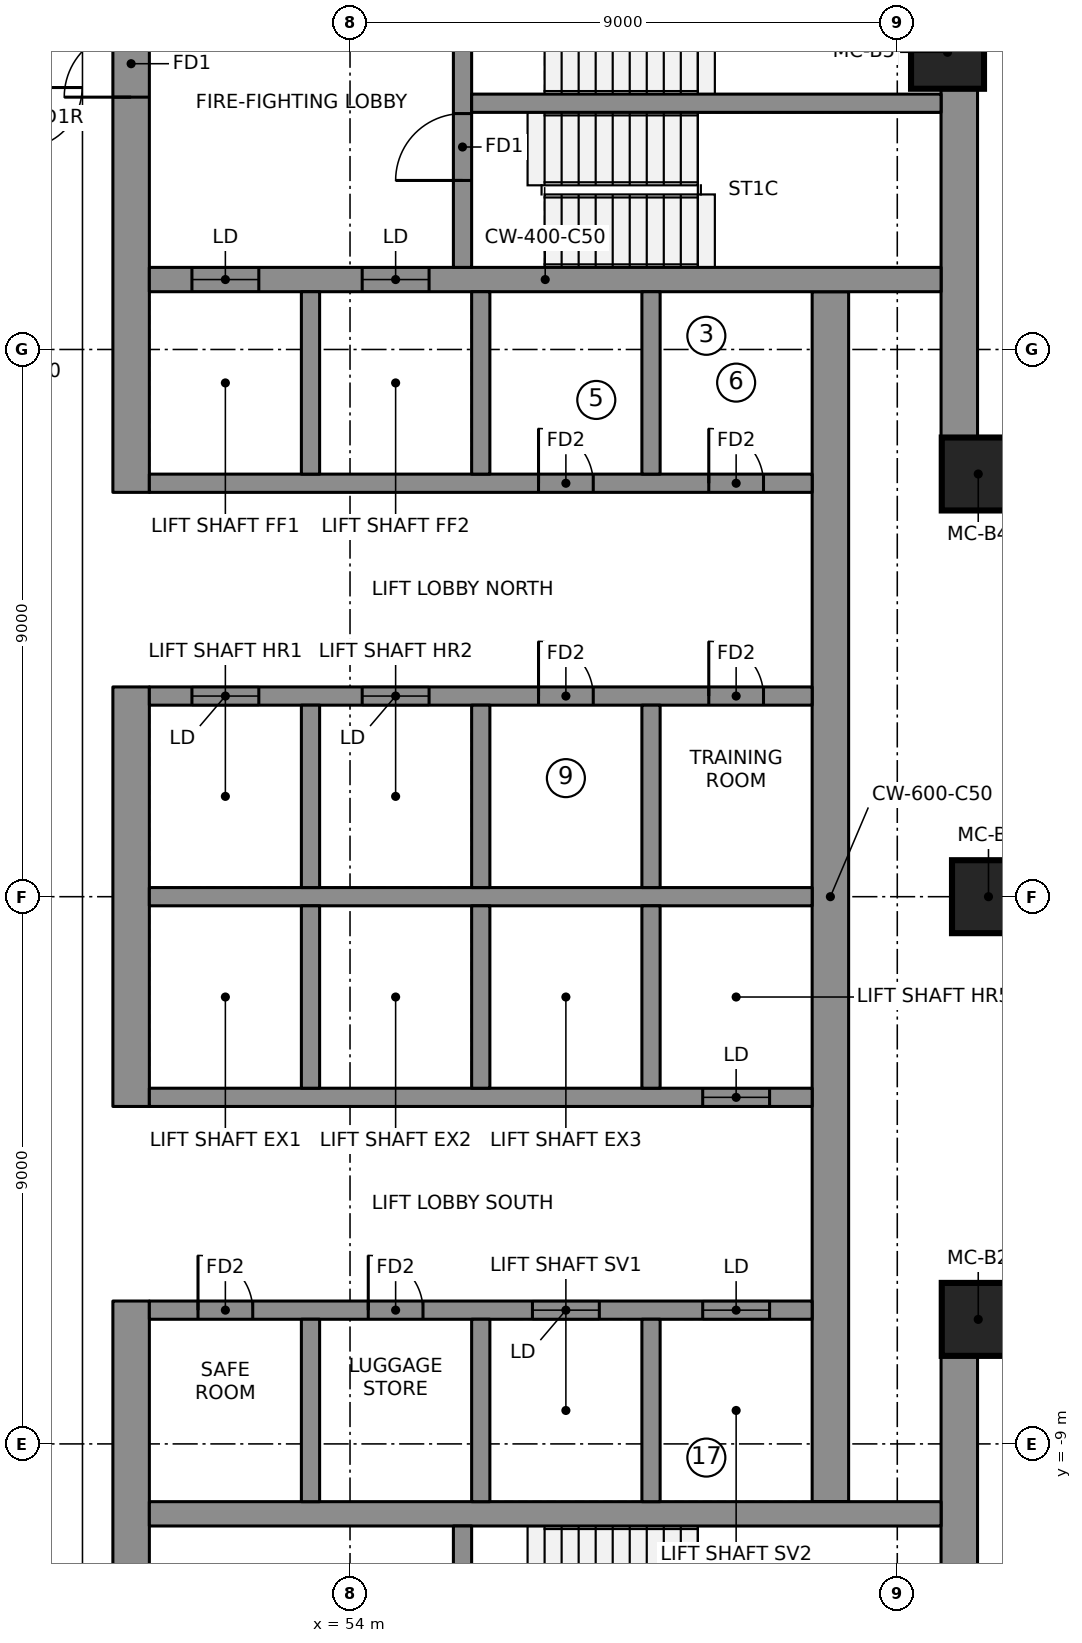
"""IFC4 building model, lengths in metres.
Left out: names, types, materials, properties, quantities, classifications, styles, units other than length and angle.
Written with IfcOpenShell. Run it as: python <this file> out.ifc"""

import sys

from ifc_helpers import new_model, si_unit, direction, frame, frame_2d, origin, origin_2d, place, context, subcontext, project, spatial, rectangle, extrude, element, fill, save


model = new_model("IFC4")
c1 = context("Model", 3, precision=1e-05, world=origin(), true_north=direction((0.0, 1.0)))
c2 = subcontext(c1, "Body", "Model", "MODEL_VIEW")
j1 = project(units=[si_unit("LENGTHUNIT", "METRE"), si_unit("PLANEANGLEUNIT", "RADIAN")], contexts=[c1])
p1 = place(None, origin())
s1 = spatial("IfcSite", under=j1, at=p1, CompositionType="ELEMENT")
p2 = place(p1, origin())
s2 = spatial("IfcBuilding", under=s1, at=p2, CompositionType="ELEMENT")
p3 = place(p2, frame((0.0, 0.0, 224.35)))
s3 = spatial("IfcBuildingStorey", under=s2, at=p3, CompositionType="ELEMENT", Elevation=224.35)
p4 = place(p3, frame((50.4, 6.65, 0.0), z_axis=(0.0, 0.0, 1.0), x_axis=(0.0, 1.0, 0.0)))
e1 = element("IfcWall", 1, at=p4, inside=s3, PredefinedType="SHEAR", context=c2, shape_type="SweptSolid", body=[
    extrude(rectangle(XDim=9.7, YDim=0.6, at=frame_2d((4.85, 0.0))), origin(), (0.0, 0.0, 1.0), 3.55),
])
p5 = place(p4, frame((6.5, 0.0, 0.0)))
e2 = element("IfcOpeningElement", 2, at=p5, cuts=e1, PredefinedType="OPENING", context=c2, shape_type="SweptSolid", body=[
    extrude(rectangle(XDim=1.1, YDim=2.1, at=frame_2d((0.55, 1.05))), frame((0.0, 0.31, 0.0), z_axis=(0.0, -1.0, 0.0), x_axis=(1.0, 0.0, 0.0)), (0.0, 0.0, 1.0), 0.62),
])
p6 = place(p3, frame((50.4, -3.45, 0.0), z_axis=(0.0, 0.0, 1.0), x_axis=(0.0, 1.0, 0.0)))
e3 = element("IfcWall", 3, at=p6, inside=s3, PredefinedType="SHEAR", context=c2, shape_type="SweptSolid", body=[
    extrude(rectangle(XDim=6.9, YDim=0.6, at=frame_2d((3.45, 0.0))), origin(), (0.0, 0.0, 1.0), 3.55),
])
p7 = place(p3, frame((50.4, -16.35, 0.0), z_axis=(0.0, 0.0, 1.0), x_axis=(0.0, 1.0, 0.0)))
e4 = element("IfcWall", 4, at=p7, inside=s3, PredefinedType="SHEAR", context=c2, shape_type="SweptSolid", body=[
    extrude(rectangle(XDim=9.7, YDim=0.6, at=frame_2d((4.85, 0.0))), origin(), (0.0, 0.0, 1.0), 3.55),
])
p8 = place(p7, frame((2.1, 0.0, 0.0)))
e5 = element("IfcOpeningElement", 5, at=p8, cuts=e4, PredefinedType="OPENING", context=c2, shape_type="SweptSolid", body=[
    extrude(rectangle(XDim=1.1, YDim=2.1, at=frame_2d((0.55, 1.05))), frame((0.0, 0.31, 0.0), z_axis=(0.0, -1.0, 0.0), x_axis=(1.0, 0.0, 0.0)), (0.0, 0.0, 1.0), 0.62),
])
for number, where, z_axis, x_axis in (
    (6, (64.02, 7.502, 0.0), (0.0, 0.0, 1.0), (0.0, 1.0, 0.0)),
    (7, (64.02, -15.75, 0.0), (0.0, 0.0, 1.0), (0.0, 1.0, 0.0)),
):
    element("IfcWall", number, at=place(p3, frame(where, z_axis=z_axis, x_axis=x_axis)), inside=s3, PredefinedType="SHEAR", context=c2, shape_type="SweptSolid", body=[
        extrude(rectangle(XDim=8.248, YDim=0.6, at=frame_2d((4.124, 0.0))), origin(), (0.0, 0.0, 1.0), 3.55),
    ])
p9 = place(p3, frame((61.9, -9.95, 0.0), z_axis=(0.0, 0.0, 1.0), x_axis=(0.0, 1.0, 0.0)))
e8 = element("IfcWall", 8, at=p9, inside=s3, PredefinedType="SHEAR", context=c2, shape_type="SweptSolid", body=[
    extrude(rectangle(XDim=19.9, YDim=0.6, at=frame_2d((9.95, 0.0))), origin(), (0.0, 0.0, 1.0), 3.55),
])
p10 = place(p3, frame((50.7, 10.15, 0.0), z_axis=(0.0, 0.0, 1.0), x_axis=(1.0, 0.0, 0.0)))
e9 = element("IfcWall", 9, at=p10, inside=s3, PredefinedType="SHEAR", context=c2, shape_type="SweptSolid", body=[
    extrude(rectangle(XDim=13.02, YDim=0.4, at=frame_2d((6.51, 0.0))), origin(), (0.0, 0.0, 1.0), 3.55),
])
p11 = place(p10, frame((0.7, 0.0, 0.0)))
e10 = element("IfcOpeningElement", 10, at=p11, cuts=e9, PredefinedType="OPENING", context=c2, shape_type="SweptSolid", body=[
    extrude(rectangle(XDim=1.1, YDim=2.1, at=frame_2d((0.55, 1.05))), frame((0.0, 0.21, 0.0), z_axis=(0.0, -1.0, 0.0), x_axis=(1.0, 0.0, 0.0)), (0.0, 0.0, 1.0), 0.42),
])
p12 = place(p10, frame((3.5, 0.0, 0.0)))
e11 = element("IfcOpeningElement", 11, at=p12, cuts=e9, PredefinedType="OPENING", context=c2, shape_type="SweptSolid", body=[
    extrude(rectangle(XDim=1.1, YDim=2.1, at=frame_2d((0.55, 1.05))), frame((0.0, 0.21, 0.0), z_axis=(0.0, -1.0, 0.0), x_axis=(1.0, 0.0, 0.0)), (0.0, 0.0, 1.0), 0.42),
])
p13 = place(p3, frame((50.7, -10.15, 0.0), z_axis=(0.0, 0.0, 1.0), x_axis=(1.0, 0.0, 0.0)))
e12 = element("IfcWall", 12, at=p13, inside=s3, PredefinedType="SHEAR", context=c2, shape_type="SweptSolid", body=[
    extrude(rectangle(XDim=13.02, YDim=0.4, at=frame_2d((6.51, 0.0))), origin(), (0.0, 0.0, 1.0), 3.55),
])
p14 = place(p3, frame((50.7, 0.0, 0.0), z_axis=(0.0, 0.0, 1.0), x_axis=(1.0, 0.0, 0.0)))
e13 = element("IfcWall", 13, at=p14, inside=s3, PredefinedType="SHEAR", context=c2, shape_type="SweptSolid", body=[
    extrude(rectangle(XDim=10.9, YDim=0.3, at=frame_2d((5.45, 0.0))), origin(), (0.0, 0.0, 1.0), 3.55),
])
p15 = place(p3, frame((50.7, 3.3, 0.0), z_axis=(0.0, 0.0, 1.0), x_axis=(1.0, 0.0, 0.0)))
e14 = element("IfcWall", 14, at=p15, inside=s3, PredefinedType="SHEAR", context=c2, shape_type="SweptSolid", body=[
    extrude(rectangle(XDim=10.9, YDim=0.3, at=frame_2d((5.45, 0.0))), origin(), (0.0, 0.0, 1.0), 3.55),
])
p16 = place(p15, frame((0.7, 0.0, 0.0)))
e15 = element("IfcOpeningElement", 15, at=p16, cuts=e14, PredefinedType="OPENING", context=c2, shape_type="SweptSolid", body=[
    extrude(rectangle(XDim=1.1, YDim=2.1, at=frame_2d((0.55, 1.05))), frame((0.0, 0.16, 0.0), z_axis=(0.0, -1.0, 0.0), x_axis=(1.0, 0.0, 0.0)), (0.0, 0.0, 1.0), 0.32),
])
p17 = place(p15, frame((3.5, 0.0, 0.0)))
e16 = element("IfcOpeningElement", 16, at=p17, cuts=e14, PredefinedType="OPENING", context=c2, shape_type="SweptSolid", body=[
    extrude(rectangle(XDim=1.1, YDim=2.1, at=frame_2d((0.55, 1.05))), frame((0.0, 0.16, 0.0), z_axis=(0.0, -1.0, 0.0), x_axis=(1.0, 0.0, 0.0)), (0.0, 0.0, 1.0), 0.32),
])
p18 = place(p15, frame((6.4, 0.0, 0.0)))
e17 = element("IfcOpeningElement", 17, at=p18, cuts=e14, PredefinedType="OPENING", context=c2, shape_type="SweptSolid", body=[
    extrude(rectangle(XDim=0.9, YDim=2.1, at=frame_2d((0.45, 1.05))), frame((0.0, 0.16, 0.0), z_axis=(0.0, -1.0, 0.0), x_axis=(1.0, 0.0, 0.0)), (0.0, 0.0, 1.0), 0.32),
])
p19 = place(p15, frame((9.2, 0.0, 0.0)))
e18 = element("IfcOpeningElement", 18, at=p19, cuts=e14, PredefinedType="OPENING", context=c2, shape_type="SweptSolid", body=[
    extrude(rectangle(XDim=0.9, YDim=2.1, at=frame_2d((0.45, 1.05))), frame((0.0, 0.16, 0.0), z_axis=(0.0, -1.0, 0.0), x_axis=(1.0, 0.0, 0.0)), (0.0, 0.0, 1.0), 0.32),
])
p20 = place(p3, frame((50.7, 6.8, 0.0), z_axis=(0.0, 0.0, 1.0), x_axis=(1.0, 0.0, 0.0)))
e19 = element("IfcWall", 19, at=p20, inside=s3, PredefinedType="SHEAR", context=c2, shape_type="SweptSolid", body=[
    extrude(rectangle(XDim=10.9, YDim=0.3, at=frame_2d((5.45, 0.0))), origin(), (0.0, 0.0, 1.0), 3.55),
])
p21 = place(p20, frame((6.4, 0.0, 0.0)))
e20 = element("IfcOpeningElement", 20, at=p21, cuts=e19, PredefinedType="OPENING", context=c2, shape_type="SweptSolid", body=[
    extrude(rectangle(XDim=0.9, YDim=2.1, at=frame_2d((0.45, 1.05))), frame((0.0, 0.16, 0.0), z_axis=(0.0, -1.0, 0.0), x_axis=(1.0, 0.0, 0.0)), (0.0, 0.0, 1.0), 0.32),
])
p22 = place(p20, frame((9.2, 0.0, 0.0)))
e21 = element("IfcOpeningElement", 21, at=p22, cuts=e19, PredefinedType="OPENING", context=c2, shape_type="SweptSolid", body=[
    extrude(rectangle(XDim=0.9, YDim=2.1, at=frame_2d((0.45, 1.05))), frame((0.0, 0.16, 0.0), z_axis=(0.0, -1.0, 0.0), x_axis=(1.0, 0.0, 0.0)), (0.0, 0.0, 1.0), 0.32),
])
for number, where, z_axis, x_axis in (
    (22, (53.35, 0.15, 0.0), (0.0, 0.0, 1.0), (0.0, 1.0, 0.0)),
    (23, (53.35, 6.95, 0.0), (0.0, 0.0, 1.0), (0.0, 1.0, 0.0)),
    (24, (56.15, 0.15, 0.0), (0.0, 0.0, 1.0), (0.0, 1.0, 0.0)),
    (25, (56.15, 6.95, 0.0), (0.0, 0.0, 1.0), (0.0, 1.0, 0.0)),
    (26, (58.95, 0.15, 0.0), (0.0, 0.0, 1.0), (0.0, 1.0, 0.0)),
    (27, (58.95, 6.95, 0.0), (0.0, 0.0, 1.0), (0.0, 1.0, 0.0)),
):
    element("IfcWall", number, at=place(p3, frame(where, z_axis=z_axis, x_axis=x_axis)), inside=s3, PredefinedType="SHEAR", context=c2, shape_type="SweptSolid", body=[
        extrude(rectangle(XDim=3.0, YDim=0.3, at=frame_2d((1.5, 0.0))), origin(), (0.0, 0.0, 1.0), 3.55),
    ])
p23 = place(p3, frame((50.7, -3.3, 0.0), z_axis=(0.0, 0.0, 1.0), x_axis=(1.0, 0.0, 0.0)))
e28 = element("IfcWall", 28, at=p23, inside=s3, PredefinedType="SHEAR", context=c2, shape_type="SweptSolid", body=[
    extrude(rectangle(XDim=10.9, YDim=0.3, at=frame_2d((5.45, 0.0))), origin(), (0.0, 0.0, 1.0), 3.55),
])
p24 = place(p23, frame((9.1, 0.0, 0.0)))
e29 = element("IfcOpeningElement", 29, at=p24, cuts=e28, PredefinedType="OPENING", context=c2, shape_type="SweptSolid", body=[
    extrude(rectangle(XDim=1.1, YDim=2.1, at=frame_2d((0.55, 1.05))), frame((0.0, 0.16, 0.0), z_axis=(0.0, -1.0, 0.0), x_axis=(1.0, 0.0, 0.0)), (0.0, 0.0, 1.0), 0.32),
])
p25 = place(p3, frame((50.7, -6.8, 0.0), z_axis=(0.0, 0.0, 1.0), x_axis=(1.0, 0.0, 0.0)))
e30 = element("IfcWall", 30, at=p25, inside=s3, PredefinedType="SHEAR", context=c2, shape_type="SweptSolid", body=[
    extrude(rectangle(XDim=10.9, YDim=0.3, at=frame_2d((5.45, 0.0))), origin(), (0.0, 0.0, 1.0), 3.55),
])
p26 = place(p25, frame((6.3, 0.0, 0.0)))
e31 = element("IfcOpeningElement", 31, at=p26, cuts=e30, PredefinedType="OPENING", context=c2, shape_type="SweptSolid", body=[
    extrude(rectangle(XDim=1.1, YDim=2.1, at=frame_2d((0.55, 1.05))), frame((0.0, 0.16, 0.0), z_axis=(0.0, -1.0, 0.0), x_axis=(1.0, 0.0, 0.0)), (0.0, 0.0, 1.0), 0.32),
])
p27 = place(p25, frame((9.1, 0.0, 0.0)))
e32 = element("IfcOpeningElement", 32, at=p27, cuts=e30, PredefinedType="OPENING", context=c2, shape_type="SweptSolid", body=[
    extrude(rectangle(XDim=1.1, YDim=2.1, at=frame_2d((0.55, 1.05))), frame((0.0, 0.16, 0.0), z_axis=(0.0, -1.0, 0.0), x_axis=(1.0, 0.0, 0.0)), (0.0, 0.0, 1.0), 0.32),
])
p28 = place(p25, frame((0.8, 0.0, 0.0)))
e33 = element("IfcOpeningElement", 33, at=p28, cuts=e30, PredefinedType="OPENING", context=c2, shape_type="SweptSolid", body=[
    extrude(rectangle(XDim=0.9, YDim=2.1, at=frame_2d((0.45, 1.05))), frame((0.0, 0.16, 0.0), z_axis=(0.0, -1.0, 0.0), x_axis=(1.0, 0.0, 0.0)), (0.0, 0.0, 1.0), 0.32),
])
p29 = place(p25, frame((3.6, 0.0, 0.0)))
e34 = element("IfcOpeningElement", 34, at=p29, cuts=e30, PredefinedType="OPENING", context=c2, shape_type="SweptSolid", body=[
    extrude(rectangle(XDim=0.9, YDim=2.1, at=frame_2d((0.45, 1.05))), frame((0.0, 0.16, 0.0), z_axis=(0.0, -1.0, 0.0), x_axis=(1.0, 0.0, 0.0)), (0.0, 0.0, 1.0), 0.32),
])
for number, where, z_axis, x_axis in (
    (35, (53.35, -3.15, 0.0), (0.0, 0.0, 1.0), (0.0, 1.0, 0.0)),
    (36, (53.35, -9.95, 0.0), (0.0, 0.0, 1.0), (0.0, 1.0, 0.0)),
    (37, (56.15, -3.15, 0.0), (0.0, 0.0, 1.0), (0.0, 1.0, 0.0)),
    (38, (56.15, -9.95, 0.0), (0.0, 0.0, 1.0), (0.0, 1.0, 0.0)),
    (39, (58.95, -3.15, 0.0), (0.0, 0.0, 1.0), (0.0, 1.0, 0.0)),
    (40, (58.95, -9.95, 0.0), (0.0, 0.0, 1.0), (0.0, 1.0, 0.0)),
):
    element("IfcWall", number, at=place(p3, frame(where, z_axis=z_axis, x_axis=x_axis)), inside=s3, PredefinedType="SHEAR", context=c2, shape_type="SweptSolid", body=[
        extrude(rectangle(XDim=3.0, YDim=0.3, at=frame_2d((1.5, 0.0))), origin(), (0.0, 0.0, 1.0), 3.55),
    ])
p30 = place(p3, frame((55.85, 10.35, 0.0), z_axis=(0.0, 0.0, 1.0), x_axis=(0.0, 1.0, 0.0)))
e41 = element("IfcWall", 41, at=p30, inside=s3, PredefinedType="SHEAR", context=c2, shape_type="SweptSolid", body=[
    extrude(rectangle(XDim=5.4, YDim=0.3, at=frame_2d((2.7, 0.0))), origin(), (0.0, 0.0, 1.0), 3.55),
])
p31 = place(p30, frame((1.43, 0.0, 0.0)))
e42 = element("IfcOpeningElement", 42, at=p31, cuts=e41, PredefinedType="OPENING", context=c2, shape_type="SweptSolid", body=[
    extrude(rectangle(XDim=1.1, YDim=2.1, at=frame_2d((0.55, 1.05))), frame((0.0, 0.16, 0.0), z_axis=(0.0, -1.0, 0.0), x_axis=(1.0, 0.0, 0.0)), (0.0, 0.0, 1.0), 0.32),
])
p32 = place(p30, frame((3.6, 0.0, 0.0)))
e43 = element("IfcOpeningElement", 43, at=p32, cuts=e41, PredefinedType="OPENING", context=c2, shape_type="SweptSolid", body=[
    extrude(rectangle(XDim=1.1, YDim=2.1, at=frame_2d((0.55, 1.05))), frame((0.0, 0.16, 0.0), z_axis=(0.0, -1.0, 0.0), x_axis=(1.0, 0.0, 0.0)), (0.0, 0.0, 1.0), 0.32),
])
p33 = place(p3, frame((55.85, -15.75, 0.0), z_axis=(0.0, 0.0, 1.0), x_axis=(0.0, 1.0, 0.0)))
e44 = element("IfcWall", 44, at=p33, inside=s3, PredefinedType="SHEAR", context=c2, shape_type="SweptSolid", body=[
    extrude(rectangle(XDim=5.4, YDim=0.3, at=frame_2d((2.7, 0.0))), origin(), (0.0, 0.0, 1.0), 3.55),
])
p34 = place(p33, frame((3.6, 0.0, 0.0)))
e45 = element("IfcOpeningElement", 45, at=p34, cuts=e44, PredefinedType="OPENING", context=c2, shape_type="SweptSolid", body=[
    extrude(rectangle(XDim=1.1, YDim=2.1, at=frame_2d((0.55, 1.05))), frame((0.0, 0.16, 0.0), z_axis=(0.0, -1.0, 0.0), x_axis=(1.0, 0.0, 0.0)), (0.0, 0.0, 1.0), 0.32),
])
p35 = place(p33, frame((0.8, 0.0, 0.0)))
e46 = element("IfcOpeningElement", 46, at=p35, cuts=e44, PredefinedType="OPENING", context=c2, shape_type="SweptSolid", body=[
    extrude(rectangle(XDim=0.9, YDim=2.1, at=frame_2d((0.45, 1.05))), frame((0.0, 0.16, 0.0), z_axis=(0.0, -1.0, 0.0), x_axis=(1.0, 0.0, 0.0)), (0.0, 0.0, 1.0), 0.32),
])
p36 = place(p3, frame((56.0, 13.05, 0.0), z_axis=(0.0, 0.0, 1.0), x_axis=(1.0, 0.0, 0.0)))
e47 = element("IfcWall", 47, at=p36, inside=s3, PredefinedType="SHEAR", context=c2, shape_type="SweptSolid", body=[
    extrude(rectangle(XDim=7.72, YDim=0.3, at=frame_2d((3.86, 0.0))), origin(), (0.0, 0.0, 1.0), 3.55),
])
for number, where, z_axis, x_axis in (
    (48, (64.332, -6.952, 0.0), (0.0, 0.0, 1.0), (1.0, 0.0, 0.0)),
    (49, (64.5, 0.0, 0.0), (0.0, 0.0, 1.0), (1.0, 0.0, 0.0)),
    (50, (64.332, 6.952, 0.0), (0.0, 0.0, 1.0), (1.0, 0.0, 0.0)),
    (51, (63.826, 13.888, 0.0), (0.0, 0.0, 1.0), (1.0, 0.0, 0.0)),
):
    element("IfcColumn", number, at=place(p3, frame(where, z_axis=z_axis, x_axis=x_axis)), inside=s3, PredefinedType="COLUMN", context=c2, shape_type="SweptSolid", body=[
        extrude(rectangle(XDim=1.2, YDim=1.2, at=origin_2d()), origin(), (0.0, 0.0, 1.0), 3.55),
    ])
p37 = place(p11, origin())
e52 = element("IfcDoor", 52, at=p37, inside=s3, OperationType="DOUBLE_DOOR_SLIDING", PredefinedType="DOOR", context=c2, shape_type="SweptSolid", body=[
    extrude(rectangle(XDim=1.1, YDim=2.1, at=frame_2d((0.55, 1.05))), frame((0.0, 0.025, 0.0), z_axis=(0.0, -1.0, 0.0), x_axis=(1.0, 0.0, 0.0)), (0.0, 0.0, 1.0), 0.05),
])
fill(e10, e52)
p38 = place(p12, origin())
e53 = element("IfcDoor", 53, at=p38, inside=s3, OperationType="DOUBLE_DOOR_SLIDING", PredefinedType="DOOR", context=c2, shape_type="SweptSolid", body=[
    extrude(rectangle(XDim=1.1, YDim=2.1, at=frame_2d((0.55, 1.05))), frame((0.0, 0.025, 0.0), z_axis=(0.0, -1.0, 0.0), x_axis=(1.0, 0.0, 0.0)), (0.0, 0.0, 1.0), 0.05),
])
fill(e11, e53)
p39 = place(p16, origin())
e54 = element("IfcDoor", 54, at=p39, inside=s3, OperationType="DOUBLE_DOOR_SLIDING", PredefinedType="DOOR", context=c2, shape_type="SweptSolid", body=[
    extrude(rectangle(XDim=1.1, YDim=2.1, at=frame_2d((0.55, 1.05))), frame((0.0, 0.025, 0.0), z_axis=(0.0, -1.0, 0.0), x_axis=(1.0, 0.0, 0.0)), (0.0, 0.0, 1.0), 0.05),
])
fill(e15, e54)
p40 = place(p17, origin())
e55 = element("IfcDoor", 55, at=p40, inside=s3, OperationType="DOUBLE_DOOR_SLIDING", PredefinedType="DOOR", context=c2, shape_type="SweptSolid", body=[
    extrude(rectangle(XDim=1.1, YDim=2.1, at=frame_2d((0.55, 1.05))), frame((0.0, 0.025, 0.0), z_axis=(0.0, -1.0, 0.0), x_axis=(1.0, 0.0, 0.0)), (0.0, 0.0, 1.0), 0.05),
])
fill(e16, e55)
p41 = place(p24, origin())
e56 = element("IfcDoor", 56, at=p41, inside=s3, OperationType="DOUBLE_DOOR_SLIDING", PredefinedType="DOOR", context=c2, shape_type="SweptSolid", body=[
    extrude(rectangle(XDim=1.1, YDim=2.1, at=frame_2d((0.55, 1.05))), frame((0.0, 0.025, 0.0), z_axis=(0.0, -1.0, 0.0), x_axis=(1.0, 0.0, 0.0)), (0.0, 0.0, 1.0), 0.05),
])
fill(e29, e56)
p42 = place(p26, origin())
e57 = element("IfcDoor", 57, at=p42, inside=s3, OperationType="DOUBLE_DOOR_SLIDING", PredefinedType="DOOR", context=c2, shape_type="SweptSolid", body=[
    extrude(rectangle(XDim=1.1, YDim=2.1, at=frame_2d((0.55, 1.05))), frame((0.0, 0.025, 0.0), z_axis=(0.0, -1.0, 0.0), x_axis=(1.0, 0.0, 0.0)), (0.0, 0.0, 1.0), 0.05),
])
fill(e31, e57)
p43 = place(p27, origin())
e58 = element("IfcDoor", 58, at=p43, inside=s3, OperationType="DOUBLE_DOOR_SLIDING", PredefinedType="DOOR", context=c2, shape_type="SweptSolid", body=[
    extrude(rectangle(XDim=1.1, YDim=2.1, at=frame_2d((0.55, 1.05))), frame((0.0, 0.025, 0.0), z_axis=(0.0, -1.0, 0.0), x_axis=(1.0, 0.0, 0.0)), (0.0, 0.0, 1.0), 0.05),
])
fill(e32, e58)
p44 = place(p31, origin())
e59 = element("IfcDoor", 59, at=p44, inside=s3, OperationType="SINGLE_SWING_RIGHT", PredefinedType="DOOR", context=c2, shape_type="SweptSolid", body=[
    extrude(rectangle(XDim=1.1, YDim=2.1, at=frame_2d((0.55, 1.05))), frame((0.0, 0.025, 0.0), z_axis=(0.0, -1.0, 0.0), x_axis=(1.0, 0.0, 0.0)), (0.0, 0.0, 1.0), 0.05),
])
fill(e42, e59)
p45 = place(p5, origin())
e60 = element("IfcDoor", 60, at=p45, inside=s3, OperationType="SINGLE_SWING_RIGHT", PredefinedType="DOOR", context=c2, shape_type="SweptSolid", body=[
    extrude(rectangle(XDim=1.1, YDim=2.1, at=frame_2d((0.55, 1.05))), frame((0.0, 0.025, 0.0), z_axis=(0.0, -1.0, 0.0), x_axis=(1.0, 0.0, 0.0)), (0.0, 0.0, 1.0), 0.05),
])
fill(e2, e60)
p46 = place(p21, origin())
e61 = element("IfcDoor", 61, at=p46, inside=s3, OperationType="SINGLE_SWING_LEFT", PredefinedType="DOOR", context=c2, shape_type="SweptSolid", body=[
    extrude(rectangle(XDim=0.9, YDim=2.1, at=frame_2d((0.45, 1.05))), frame((0.0, 0.025, 0.0), z_axis=(0.0, -1.0, 0.0), x_axis=(1.0, 0.0, 0.0)), (0.0, 0.0, 1.0), 0.05),
])
fill(e20, e61)
p47 = place(p22, origin())
e62 = element("IfcDoor", 62, at=p47, inside=s3, OperationType="SINGLE_SWING_LEFT", PredefinedType="DOOR", context=c2, shape_type="SweptSolid", body=[
    extrude(rectangle(XDim=0.9, YDim=2.1, at=frame_2d((0.45, 1.05))), frame((0.0, 0.025, 0.0), z_axis=(0.0, -1.0, 0.0), x_axis=(1.0, 0.0, 0.0)), (0.0, 0.0, 1.0), 0.05),
])
fill(e21, e62)
p48 = place(p18, origin())
e63 = element("IfcDoor", 63, at=p48, inside=s3, OperationType="SINGLE_SWING_LEFT", PredefinedType="DOOR", context=c2, shape_type="SweptSolid", body=[
    extrude(rectangle(XDim=0.9, YDim=2.1, at=frame_2d((0.45, 1.05))), frame((0.0, 0.025, 0.0), z_axis=(0.0, -1.0, 0.0), x_axis=(1.0, 0.0, 0.0)), (0.0, 0.0, 1.0), 0.05),
])
fill(e17, e63)
p49 = place(p19, origin())
e64 = element("IfcDoor", 64, at=p49, inside=s3, OperationType="SINGLE_SWING_LEFT", PredefinedType="DOOR", context=c2, shape_type="SweptSolid", body=[
    extrude(rectangle(XDim=0.9, YDim=2.1, at=frame_2d((0.45, 1.05))), frame((0.0, 0.025, 0.0), z_axis=(0.0, -1.0, 0.0), x_axis=(1.0, 0.0, 0.0)), (0.0, 0.0, 1.0), 0.05),
])
fill(e18, e64)
p50 = place(p28, origin())
e65 = element("IfcDoor", 65, at=p50, inside=s3, OperationType="SINGLE_SWING_LEFT", PredefinedType="DOOR", context=c2, shape_type="SweptSolid", body=[
    extrude(rectangle(XDim=0.9, YDim=2.1, at=frame_2d((0.45, 1.05))), frame((0.0, 0.025, 0.0), z_axis=(0.0, -1.0, 0.0), x_axis=(1.0, 0.0, 0.0)), (0.0, 0.0, 1.0), 0.05),
])
fill(e33, e65)
p51 = place(p29, origin())
e66 = element("IfcDoor", 66, at=p51, inside=s3, OperationType="SINGLE_SWING_LEFT", PredefinedType="DOOR", context=c2, shape_type="SweptSolid", body=[
    extrude(rectangle(XDim=0.9, YDim=2.1, at=frame_2d((0.45, 1.05))), frame((0.0, 0.025, 0.0), z_axis=(0.0, -1.0, 0.0), x_axis=(1.0, 0.0, 0.0)), (0.0, 0.0, 1.0), 0.05),
])
fill(e34, e66)
save(model, sys.argv[1])
